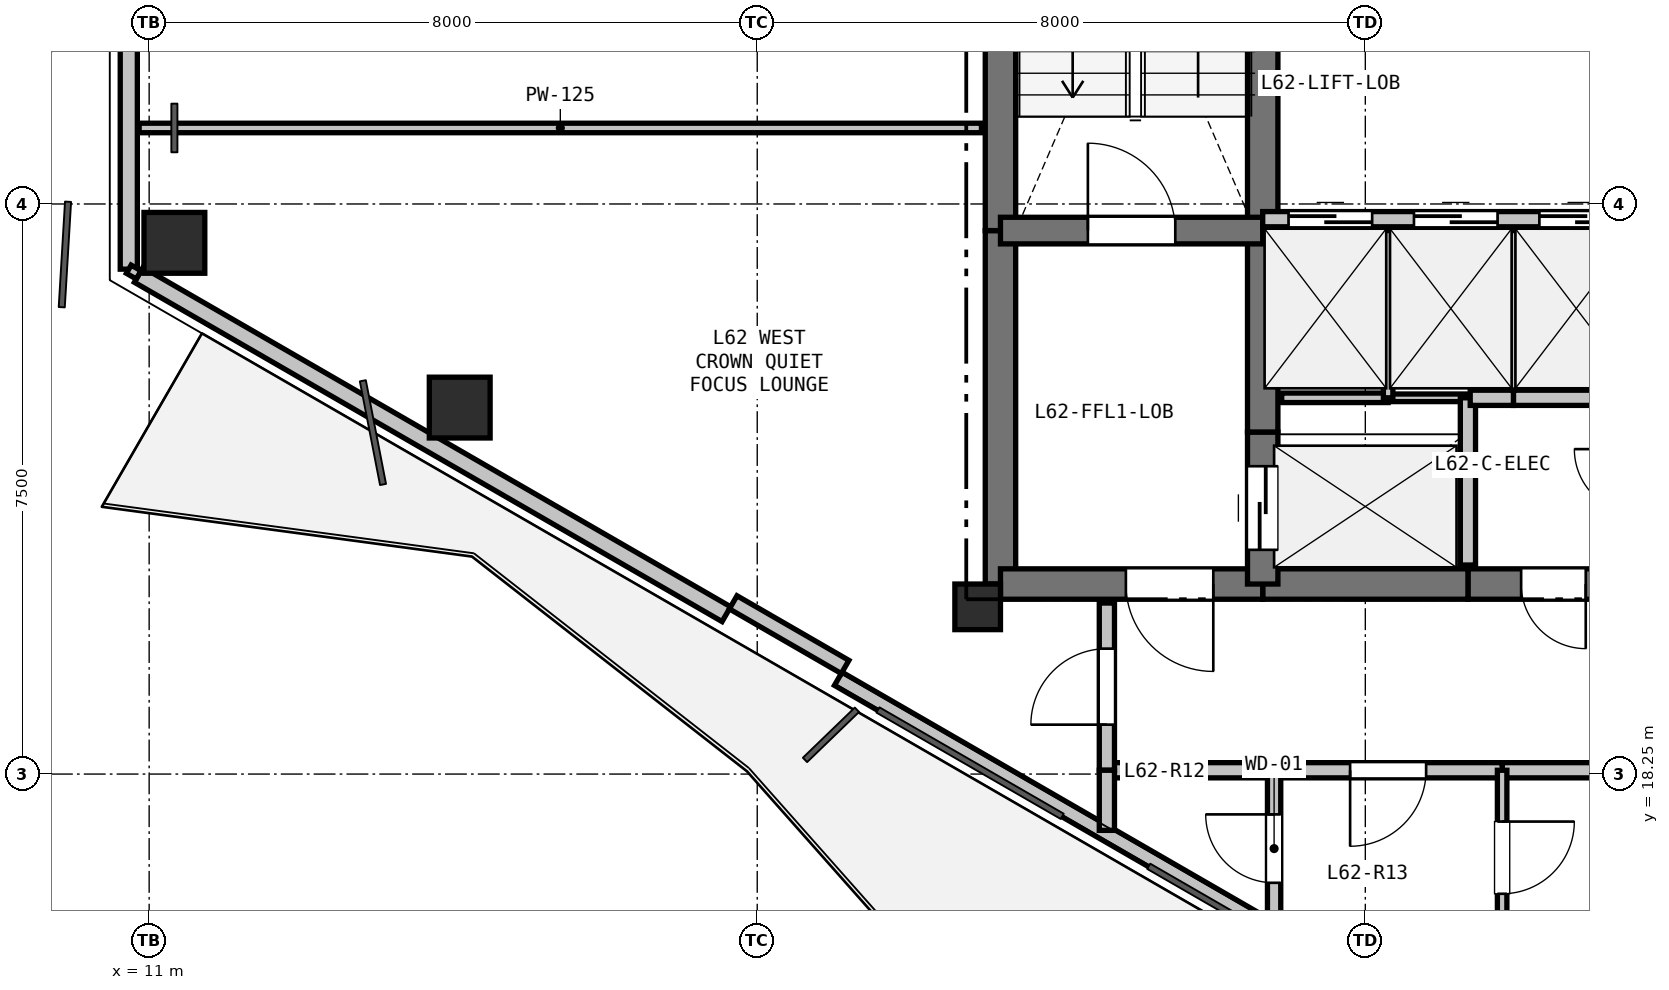
"""IFC4 building model, lengths in metres.
Left out: names, types, materials, properties, quantities, classifications, styles, units other than length and angle.
Written with IfcOpenShell. Run it as: python <this file> out.ifc"""

import sys

from ifc_helpers import new_model, si_unit, direction, frame, frame_2d, origin, origin_2d, place, context, subcontext, project, spatial, rectangle, hollow_rectangle, extrude, element, fill, save


model = new_model("IFC4")
c1 = context("Model", 3, precision=1e-05, world=origin(), true_north=direction((0.0, 1.0)))
c2 = subcontext(c1, "Body", "Model", "MODEL_VIEW")
j1 = project(units=[si_unit("LENGTHUNIT", "METRE"), si_unit("PLANEANGLEUNIT", "RADIAN")], contexts=[c1])
p1 = place(None, origin())
s1 = spatial("IfcSite", under=j1, at=p1, CompositionType="ELEMENT")
p2 = place(p1, origin())
s2 = spatial("IfcBuilding", under=s1, at=p2, CompositionType="ELEMENT")
p3 = place(p2, frame((0.0, 0.0, 223.2)))
s3 = spatial("IfcBuildingStorey", under=s2, at=p3, CompositionType="ELEMENT", Elevation=223.2)
p4 = place(p3, frame((21.9, 20.45, 0.0), z_axis=(0.0, 0.0, 1.0), x_axis=(1.0, 0.0, 0.0)))
e1 = element("IfcColumn", 1, at=p4, inside=s3, PredefinedType="COLUMN", context=c2, shape_type="SweptSolid", body=[
    extrude(rectangle(XDim=0.6, YDim=0.6, at=origin_2d()), origin(), (0.0, 0.0, 1.0), 3.3),
])
for number, where, z_axis, x_axis in (
    (2, (15.086, 23.072, -0.22), (0.0, 0.0, 1.0), (1.0, 0.0, 0.0)),
    (3, (11.332, 25.239, -0.22), (0.0, 0.0, 1.0), (1.0, 0.0, 0.0)),
):
    element("IfcColumn", number, at=place(p3, frame(where, z_axis=z_axis, x_axis=x_axis)), inside=s3, PredefinedType="COLUMN", context=c2, shape_type="SweptSolid", body=[
        extrude(hollow_rectangle(XDim=0.8, YDim=0.8, WallThickness=0.025, at=origin_2d()), origin(), (0.0, 0.0, 1.0), 3.52),
    ])
p5 = place(p3, frame((10.732, 24.892, 0.0), z_axis=(0.0, 0.0, 1.0), x_axis=(0.0, 1.0, 0.0)))
e4 = element("IfcWall", 4, at=p5, inside=s3, PredefinedType="SOLIDWALL", context=c2, shape_type="SweptSolid", body=[
    extrude(rectangle(XDim=3.715, YDim=0.225, at=frame_2d((1.858, 0.0))), origin(), (0.0, 0.0, 1.0), 2.7),
])
p6 = place(p3, frame((27.191, 15.389, 0.0), z_axis=(0.0, 0.0, 1.0), x_axis=(-0.866019557082, 0.500010126649, 0.0)))
e5 = element("IfcWall", 5, at=p6, inside=s3, PredefinedType="PARAPET", context=c2, shape_type="SweptSolid", body=[
    extrude(rectangle(XDim=8.228, YDim=0.2, at=frame_2d((4.114, 0.0))), origin(), (0.0, 0.0, 1.0), 0.2),
])
p7 = place(p3, frame((18.594, 20.354, 0.0), z_axis=(0.0, 0.0, 1.0), x_axis=(-0.866026655105, 0.499997832642, 0.0)))
e6 = element("IfcWall", 6, at=p7, inside=s3, PredefinedType="SOLIDWALL", context=c2, shape_type="SweptSolid", body=[
    extrude(rectangle(XDim=8.928, YDim=0.225, at=frame_2d((4.464, 0.0))), origin(), (0.0, 0.0, 1.0), 2.7),
])
p8 = place(p3, frame((20.156, 19.659, 0.0), z_axis=(0.0, 0.0, 1.0), x_axis=(-0.866025371046, 0.500000056704, 0.0)))
e7 = element("IfcWall", 7, at=p8, inside=s3, PredefinedType="PARAPET", context=c2, shape_type="SweptSolid", body=[
    extrude(rectangle(XDim=1.7, YDim=0.2, at=frame_2d((0.85, 0.0))), origin(), (0.0, 0.0, 1.0), 2.7),
])
p9 = place(p3, frame((22.2, 20.75, 0.0), z_axis=(0.0, 0.0, 1.0), x_axis=(0.0, 1.0, 0.0)))
e8 = element("IfcWall", 8, at=p9, inside=s3, PredefinedType="SHEAR", context=c2, shape_type="SweptSolid", body=[
    extrude(rectangle(XDim=4.65, YDim=0.4, at=frame_2d((2.325, 0.0))), origin(), (0.0, 0.0, 1.0), 3.08),
])
p10 = place(p3, frame((22.2, 25.4, 0.0), z_axis=(0.0, 0.0, 1.0), x_axis=(0.0, 1.0, 0.0)))
e9 = element("IfcWall", 9, at=p10, inside=s3, PredefinedType="SHEAR", context=c2, shape_type="SweptSolid", body=[
    extrude(rectangle(XDim=7.35, YDim=0.4, at=frame_2d((3.675, 0.0))), origin(), (0.0, 0.0, 1.0), 3.08),
])
p11 = place(p3, frame((30.6, 20.75, 0.0), z_axis=(0.0, 0.0, 1.0), x_axis=(-1.0, 0.0, 0.0)))
e10 = element("IfcWall", 10, at=p11, inside=s3, PredefinedType="SHEAR", context=c2, shape_type="SweptSolid", body=[
    extrude(rectangle(XDim=2.25, YDim=0.4, at=frame_2d((1.125, 0.0))), origin(), (0.0, 0.0, 1.0), 3.08),
])
p12 = place(p11, frame((0.7, 0.0, 0.0)))
e11 = element("IfcOpeningElement", 11, at=p12, cuts=e10, PredefinedType="OPENING", context=c2, shape_type="SweptSolid", body=[
    extrude(rectangle(XDim=0.85, YDim=2.1, at=frame_2d((0.425, 1.05))), frame((0.0, 0.21, 0.0), z_axis=(0.0, -1.0, 0.0), x_axis=(1.0, 0.0, 0.0)), (0.0, 0.0, 1.0), 0.42),
])
p13 = place(p3, frame((28.35, 20.75, 0.0), z_axis=(0.0, 0.0, 1.0), x_axis=(-1.0, 0.0, 0.0)))
e12 = element("IfcWall", 12, at=p13, inside=s3, PredefinedType="SHEAR", context=c2, shape_type="SweptSolid", body=[
    extrude(rectangle(XDim=2.7, YDim=0.4, at=frame_2d((1.35, 0.0))), origin(), (0.0, 0.0, 1.0), 3.08),
])
p14 = place(p3, frame((25.65, 20.75, 0.0), z_axis=(0.0, 0.0, 1.0), x_axis=(-1.0, 0.0, 0.0)))
e13 = element("IfcWall", 13, at=p14, inside=s3, PredefinedType="SHEAR", context=c2, shape_type="SweptSolid", body=[
    extrude(rectangle(XDim=3.45, YDim=0.4, at=frame_2d((1.725, 0.0))), origin(), (0.0, 0.0, 1.0), 3.08),
])
p15 = place(p14, frame((0.65, 0.0, 0.0)))
e14 = element("IfcOpeningElement", 14, at=p15, cuts=e13, PredefinedType="OPENING", context=c2, shape_type="SweptSolid", body=[
    extrude(rectangle(XDim=1.15, YDim=2.15, at=frame_2d((0.575, 1.075))), frame((0.0, 0.21, 0.0), z_axis=(0.0, -1.0, 0.0), x_axis=(1.0, 0.0, 0.0)), (0.0, 0.0, 1.0), 0.42),
])
p16 = place(p3, frame((25.65, 20.75, 0.0), z_axis=(0.0, 0.0, 1.0), x_axis=(0.0, 1.0, 0.0)))
e15 = element("IfcWall", 15, at=p16, inside=s3, PredefinedType="SHEAR", context=c2, shape_type="SweptSolid", body=[
    extrude(rectangle(XDim=2.0, YDim=0.4, at=frame_2d((1.0, 0.0))), origin(), (0.0, 0.0, 1.0), 3.08),
])
p17 = place(p16, frame((0.45, 0.0, 0.0)))
e16 = element("IfcOpeningElement", 16, at=p17, cuts=e15, PredefinedType="OPENING", context=c2, shape_type="SweptSolid", body=[
    extrude(rectangle(XDim=1.1, YDim=2.15, at=frame_2d((0.55, 1.075))), frame((0.0, 0.21, 0.0), z_axis=(0.0, -1.0, 0.0), x_axis=(1.0, 0.0, 0.0)), (0.0, 0.0, 1.0), 0.42),
])
p18 = place(p3, frame((25.65, 22.75, 0.0), z_axis=(0.0, 0.0, 1.0), x_axis=(0.0, 1.0, 0.0)))
e17 = element("IfcWall", 17, at=p18, inside=s3, PredefinedType="SHEAR", context=c2, shape_type="SweptSolid", body=[
    extrude(rectangle(XDim=2.8, YDim=0.4, at=frame_2d((1.4, 0.0))), origin(), (0.0, 0.0, 1.0), 3.08),
])
p19 = place(p3, frame((25.65, 25.55, 0.0), z_axis=(0.0, 0.0, 1.0), x_axis=(0.0, 1.0, 0.0)))
e18 = element("IfcWall", 18, at=p19, inside=s3, PredefinedType="SHEAR", context=c2, shape_type="SweptSolid", body=[
    extrude(rectangle(XDim=2.4, YDim=0.4, at=frame_2d((1.2, 0.0))), origin(), (0.0, 0.0, 1.0), 3.08),
])
p20 = place(p3, frame((22.2, 25.4, 0.0), z_axis=(0.0, 0.0, 1.0), x_axis=(1.0, 0.0, 0.0)))
e19 = element("IfcWall", 19, at=p20, inside=s3, PredefinedType="SHEAR", context=c2, shape_type="SweptSolid", body=[
    extrude(rectangle(XDim=3.45, YDim=0.35, at=frame_2d((1.725, 0.0))), origin(), (0.0, 0.0, 1.0), 3.08),
])
p21 = place(p20, frame((1.15, 0.0, 0.0)))
e20 = element("IfcOpeningElement", 20, at=p21, cuts=e19, PredefinedType="OPENING", context=c2, shape_type="SweptSolid", body=[
    extrude(rectangle(XDim=1.15, YDim=2.15, at=frame_2d((0.575, 1.075))), frame((0.0, 0.185, 0.0), z_axis=(0.0, -1.0, 0.0), x_axis=(1.0, 0.0, 0.0)), (0.0, 0.0, 1.0), 0.37),
])
p22 = place(p3, frame((25.65, 25.55, 0.0), z_axis=(0.0, 0.0, 1.0), x_axis=(1.0, 0.0, 0.0)))
e21 = element("IfcWall", 21, at=p22, inside=s3, PredefinedType="PARTITIONING", context=c2, shape_type="SweptSolid", body=[
    extrude(rectangle(XDim=4.95, YDim=0.2, at=frame_2d((2.475, 0.0))), origin(), (0.0, 0.0, 1.0), 3.08),
])
p23 = place(p22, frame((0.34, 0.0, 0.0)))
e22 = element("IfcOpeningElement", 22, at=p23, cuts=e21, PredefinedType="OPENING", context=c2, shape_type="SweptSolid", body=[
    extrude(rectangle(XDim=1.1, YDim=2.15, at=frame_2d((0.55, 1.075))), frame((0.0, 0.11, 0.0), z_axis=(0.0, -1.0, 0.0), x_axis=(1.0, 0.0, 0.0)), (0.0, 0.0, 1.0), 0.22),
])
p24 = place(p22, frame((1.99, 0.0, 0.0)))
e23 = element("IfcOpeningElement", 23, at=p24, cuts=e21, PredefinedType="OPENING", context=c2, shape_type="SweptSolid", body=[
    extrude(rectangle(XDim=1.1, YDim=2.15, at=frame_2d((0.55, 1.075))), frame((0.0, 0.11, 0.0), z_axis=(0.0, -1.0, 0.0), x_axis=(1.0, 0.0, 0.0)), (0.0, 0.0, 1.0), 0.22),
])
p25 = place(p22, frame((3.64, 0.0, 0.0)))
e24 = element("IfcOpeningElement", 24, at=p25, cuts=e21, PredefinedType="OPENING", context=c2, shape_type="SweptSolid", body=[
    extrude(rectangle(XDim=1.1, YDim=2.15, at=frame_2d((0.55, 1.075))), frame((0.0, 0.11, 0.0), z_axis=(0.0, -1.0, 0.0), x_axis=(1.0, 0.0, 0.0)), (0.0, 0.0, 1.0), 0.22),
])
p26 = place(p3, frame((25.9, 23.2, 0.0), z_axis=(0.0, 0.0, 1.0), x_axis=(1.0, 0.0, 0.0)))
e25 = element("IfcWall", 25, at=p26, inside=s3, PredefinedType="PARTITIONING", context=c2, shape_type="SweptSolid", body=[
    extrude(rectangle(XDim=1.4, YDim=0.125, at=frame_2d((0.7, 0.0))), origin(), (0.0, 0.0, 1.0), 3.08),
])
p27 = place(p3, frame((27.3, 23.2, 0.0), z_axis=(0.0, 0.0, 1.0), x_axis=(1.0, 0.0, 0.0)))
e26 = element("IfcWall", 26, at=p27, inside=s3, PredefinedType="PARTITIONING", context=c2, shape_type="SweptSolid", body=[
    extrude(rectangle(XDim=1.05, YDim=0.1, at=frame_2d((0.525, 0.0))), origin(), (0.0, 0.0, 1.0), 3.08),
])
p28 = place(p3, frame((28.35, 23.2, 0.0), z_axis=(0.0, 0.0, 1.0), x_axis=(0.0, -1.0, 0.0)))
e27 = element("IfcWall", 27, at=p28, inside=s3, PredefinedType="PARTITIONING", context=c2, shape_type="SweptSolid", body=[
    extrude(rectangle(XDim=2.2, YDim=0.2, at=frame_2d((1.1, 0.0))), origin(), (0.0, 0.0, 1.0), 3.08),
])
p29 = place(p3, frame((27.3, 25.4, 0.0), z_axis=(0.0, 0.0, 1.0), x_axis=(0.0, -1.0, 0.0)))
e28 = element("IfcWall", 28, at=p29, inside=s3, PredefinedType="PARTITIONING", context=c2, shape_type="SweptSolid", body=[
    extrude(rectangle(XDim=2.2, YDim=0.125, at=frame_2d((1.1, 0.0))), origin(), (0.0, 0.0, 1.0), 3.08),
])
p30 = place(p3, frame((28.95, 25.4, 0.0), z_axis=(0.0, 0.0, 1.0), x_axis=(0.0, -1.0, 0.0)))
e29 = element("IfcWall", 29, at=p30, inside=s3, PredefinedType="PARTITIONING", context=c2, shape_type="SweptSolid", body=[
    extrude(rectangle(XDim=2.2, YDim=0.1, at=frame_2d((1.1, 0.0))), origin(), (0.0, 0.0, 1.0), 3.08),
])
p31 = place(p3, frame((28.95, 23.2, 0.0), z_axis=(0.0, 0.0, 1.0), x_axis=(-1.0, 0.0, 0.0)))
e30 = element("IfcWall", 30, at=p31, inside=s3, PredefinedType="PARTITIONING", context=c2, shape_type="SweptSolid", body=[
    extrude(rectangle(XDim=0.57, YDim=0.2, at=frame_2d((0.285, 0.0))), origin(), (0.0, 0.0, 1.0), 3.08),
])
p32 = place(p3, frame((30.6, 23.2, 0.0), z_axis=(0.0, 0.0, 1.0), x_axis=(-1.0, 0.0, 0.0)))
e31 = element("IfcWall", 31, at=p32, inside=s3, PredefinedType="PARTITIONING", context=c2, shape_type="SweptSolid", body=[
    extrude(rectangle(XDim=1.65, YDim=0.2, at=frame_2d((0.825, 0.0))), origin(), (0.0, 0.0, 1.0), 3.08),
])
p33 = place(p3, frame((32.2, 18.3, 0.0), z_axis=(0.0, 0.0, 1.0), x_axis=(-1.0, 0.0, 0.0)))
e32 = element("IfcWall", 32, at=p33, inside=s3, PredefinedType="PARTITIONING", context=c2, shape_type="SweptSolid", body=[
    extrude(rectangle(XDim=3.4, YDim=0.2, at=frame_2d((1.7, 0.0))), origin(), (0.0, 0.0, 1.0), 3.08),
])
p34 = place(p3, frame((28.8, 18.3, 0.0), z_axis=(0.0, 0.0, 1.0), x_axis=(-1.0, 0.0, 0.0)))
e33 = element("IfcWall", 33, at=p34, inside=s3, PredefinedType="PARTITIONING", context=c2, shape_type="SweptSolid", body=[
    extrude(rectangle(XDim=3.0, YDim=0.2, at=frame_2d((1.5, 0.0))), origin(), (0.0, 0.0, 1.0), 3.08),
])
p35 = place(p34, frame((1.0, 0.0, 0.0)))
e34 = element("IfcOpeningElement", 34, at=p35, cuts=e33, PredefinedType="OPENING", context=c2, shape_type="SweptSolid", body=[
    extrude(rectangle(XDim=1.0, YDim=2.15, at=frame_2d((0.5, 1.075))), frame((0.0, 0.11, 0.0), z_axis=(0.0, -1.0, 0.0), x_axis=(1.0, 0.0, 0.0)), (0.0, 0.0, 1.0), 0.22),
])
p36 = place(p3, frame((25.8, 18.3, 0.0), z_axis=(0.0, 0.0, 1.0), x_axis=(-1.0, 0.0, 0.0)))
e35 = element("IfcWall", 35, at=p36, inside=s3, PredefinedType="PARTITIONING", context=c2, shape_type="SweptSolid", body=[
    extrude(rectangle(XDim=2.2, YDim=0.2, at=frame_2d((1.1, 0.0))), origin(), (0.0, 0.0, 1.0), 2.365),
])
p37 = place(p3, frame((23.6, 18.3, 0.0), z_axis=(0.0, 0.0, 1.0), x_axis=(0.0, 1.0, 0.0)))
e36 = element("IfcWall", 36, at=p37, inside=s3, PredefinedType="PARTITIONING", context=c2, shape_type="SweptSolid", body=[
    extrude(rectangle(XDim=2.2, YDim=0.2, at=frame_2d((1.1, 0.0))), origin(), (0.0, 0.0, 1.0), 2.528),
])
p38 = place(p37, frame((0.6, 0.0, 0.0)))
e37 = element("IfcOpeningElement", 37, at=p38, cuts=e36, PredefinedType="OPENING", context=c2, shape_type="SweptSolid", body=[
    extrude(rectangle(XDim=1.0, YDim=2.15, at=frame_2d((0.5, 1.075))), frame((0.0, 0.11, 0.0), z_axis=(0.0, -1.0, 0.0), x_axis=(1.0, 0.0, 0.0)), (0.0, 0.0, 1.0), 0.22),
])
p39 = place(p3, frame((28.8, 18.3, 0.0), z_axis=(0.0, 0.0, 1.0), x_axis=(0.0, -1.0, 0.0)))
e38 = element("IfcWall", 38, at=p39, inside=s3, PredefinedType="PARTITIONING", context=c2, shape_type="SweptSolid", body=[
    extrude(rectangle(XDim=2.3, YDim=0.125, at=frame_2d((1.15, 0.0))), origin(), (0.0, 0.0, 1.0), 3.08),
])
p40 = place(p39, frame((0.675, 0.0, 0.0)))
e39 = element("IfcOpeningElement", 39, at=p40, cuts=e38, PredefinedType="OPENING", context=c2, shape_type="SweptSolid", body=[
    extrude(rectangle(XDim=0.95, YDim=2.1, at=frame_2d((0.475, 1.05))), frame((0.0, 0.073, 0.0), z_axis=(0.0, -1.0, 0.0), x_axis=(1.0, 0.0, 0.0)), (0.0, 0.0, 1.0), 0.145),
])
p41 = place(p3, frame((25.8, 16.239, 0.0), z_axis=(0.0, 0.0, 1.0), x_axis=(0.0, 1.0, 0.0)))
e40 = element("IfcWall", 40, at=p41, inside=s3, PredefinedType="PLUMBINGWALL", context=c2, shape_type="SweptSolid", body=[
    extrude(rectangle(XDim=2.061, YDim=0.175, at=frame_2d((1.031, 0.0))), origin(), (0.0, 0.0, 1.0), 2.365),
])
p42 = place(p41, frame((0.581, 0.0, 0.0)))
e41 = element("IfcOpeningElement", 41, at=p42, cuts=e40, PredefinedType="OPENING", context=c2, shape_type="SweptSolid", body=[
    extrude(rectangle(XDim=0.9, YDim=2.1, at=frame_2d((0.45, 1.05))), frame((0.0, 0.097, 0.0), z_axis=(0.0, -1.0, 0.0), x_axis=(1.0, 0.0, 0.0)), (0.0, 0.0, 1.0), 0.195),
])
p43 = place(p3, frame((23.6, 17.509, 0.0), z_axis=(0.0, 0.0, 1.0), x_axis=(0.0, 1.0, 0.0)))
e42 = element("IfcWall", 42, at=p43, inside=s3, PredefinedType="PARTITIONING", context=c2, shape_type="SweptSolid", body=[
    extrude(rectangle(XDim=0.791, YDim=0.2, at=frame_2d((0.396, 0.0))), origin(), (0.0, 0.0, 1.0), 2.365),
])
p44 = place(p3, frame((21.95, 26.75, 0.0), z_axis=(0.0, 0.0, 1.0), x_axis=(-1.0, 0.0, 0.0)))
e43 = element("IfcWall", 43, at=p44, inside=s3, PredefinedType="PARTITIONING", context=c2, shape_type="SweptSolid", body=[
    extrude(rectangle(XDim=11.082, YDim=0.125, at=frame_2d((5.541, 0.0))), origin(), (0.0, 0.0, 1.0), 2.605),
])
p45 = place(p3, frame((10.862, 24.817, 0.0), z_axis=(0.0, 0.0, 1.0), x_axis=(-0.866131372301, 0.499816412211, 0.0)))
e44 = element("IfcWall", 44, at=p45, inside=s3, PredefinedType="PARTITIONING", context=c2, shape_type="SweptSolid", body=[
    extrude(rectangle(XDim=0.15, YDim=0.125, at=frame_2d((0.075, 0.0))), origin(), (0.0, 0.0, 1.0), 3.08),
])
p46 = place(p23, origin())
e45 = element("IfcDoor", 45, at=p46, inside=s3, OperationType="SLIDING_TO_LEFT", PredefinedType="DOOR", context=c2, shape_type="SweptSolid", body=[
    extrude(rectangle(XDim=1.1, YDim=2.15, at=frame_2d((0.55, 1.075))), frame((0.0, 0.025, 0.0), z_axis=(0.0, -1.0, 0.0), x_axis=(1.0, 0.0, 0.0)), (0.0, 0.0, 1.0), 0.05),
])
fill(e22, e45)
p47 = place(p24, origin())
e46 = element("IfcDoor", 46, at=p47, inside=s3, OperationType="SLIDING_TO_LEFT", PredefinedType="DOOR", context=c2, shape_type="SweptSolid", body=[
    extrude(rectangle(XDim=1.1, YDim=2.15, at=frame_2d((0.55, 1.075))), frame((0.0, 0.025, 0.0), z_axis=(0.0, -1.0, 0.0), x_axis=(1.0, 0.0, 0.0)), (0.0, 0.0, 1.0), 0.05),
])
fill(e23, e46)
p48 = place(p25, origin())
e47 = element("IfcDoor", 47, at=p48, inside=s3, OperationType="SLIDING_TO_LEFT", PredefinedType="DOOR", context=c2, shape_type="SweptSolid", body=[
    extrude(rectangle(XDim=1.1, YDim=2.15, at=frame_2d((0.55, 1.075))), frame((0.0, 0.025, 0.0), z_axis=(0.0, -1.0, 0.0), x_axis=(1.0, 0.0, 0.0)), (0.0, 0.0, 1.0), 0.05),
])
fill(e24, e47)
p49 = place(p17, origin())
e48 = element("IfcDoor", 48, at=p49, inside=s3, OperationType="SLIDING_TO_LEFT", PredefinedType="DOOR", context=c2, shape_type="SweptSolid", body=[
    extrude(rectangle(XDim=1.1, YDim=2.15, at=frame_2d((0.55, 1.075))), frame((0.0, 0.025, 0.0), z_axis=(0.0, -1.0, 0.0), x_axis=(1.0, 0.0, 0.0)), (0.0, 0.0, 1.0), 0.05),
])
fill(e16, e48)
p50 = place(p21, origin())
e49 = element("IfcDoor", 49, at=p50, inside=s3, OperationType="SINGLE_SWING_LEFT", PredefinedType="DOOR", context=c2, shape_type="SweptSolid", body=[
    extrude(rectangle(XDim=1.15, YDim=2.15, at=frame_2d((0.575, 1.075))), frame((0.0, 0.025, 0.0), z_axis=(0.0, -1.0, 0.0), x_axis=(1.0, 0.0, 0.0)), (0.0, 0.0, 1.0), 0.05),
])
fill(e20, e49)
p51 = place(p15, origin())
e50 = element("IfcDoor", 50, at=p51, inside=s3, OperationType="SINGLE_SWING_LEFT", PredefinedType="DOOR", context=c2, shape_type="SweptSolid", body=[
    extrude(rectangle(XDim=1.15, YDim=2.15, at=frame_2d((0.575, 1.075))), frame((0.0, 0.025, 0.0), z_axis=(0.0, -1.0, 0.0), x_axis=(1.0, 0.0, 0.0)), (0.0, 0.0, 1.0), 0.05),
])
fill(e14, e50)
p52 = place(p35, origin())
e51 = element("IfcDoor", 51, at=p52, inside=s3, OperationType="SINGLE_SWING_RIGHT", PredefinedType="DOOR", context=c2, shape_type="SweptSolid", body=[
    extrude(rectangle(XDim=1.0, YDim=2.15, at=frame_2d((0.5, 1.075))), frame((0.0, 0.025, 0.0), z_axis=(0.0, -1.0, 0.0), x_axis=(1.0, 0.0, 0.0)), (0.0, 0.0, 1.0), 0.05),
])
fill(e34, e51)
p53 = place(p12, origin())
e52 = element("IfcDoor", 52, at=p53, inside=s3, OperationType="SINGLE_SWING_LEFT", PredefinedType="DOOR", context=c2, shape_type="SweptSolid", body=[
    extrude(rectangle(XDim=0.85, YDim=2.1, at=frame_2d((0.425, 1.05))), frame((0.0, 0.025, 0.0), z_axis=(0.0, -1.0, 0.0), x_axis=(1.0, 0.0, 0.0)), (0.0, 0.0, 1.0), 0.05),
])
fill(e11, e52)
p54 = place(p38, origin())
e53 = element("IfcDoor", 53, at=p54, inside=s3, OperationType="SINGLE_SWING_LEFT", PredefinedType="DOOR", context=c2, shape_type="SweptSolid", body=[
    extrude(rectangle(XDim=1.0, YDim=2.15, at=frame_2d((0.5, 1.075))), frame((0.0, 0.025, 0.0), z_axis=(0.0, -1.0, 0.0), x_axis=(1.0, 0.0, 0.0)), (0.0, 0.0, 1.0), 0.05),
])
fill(e37, e53)
p55 = place(p42, origin())
e54 = element("IfcDoor", 54, at=p55, inside=s3, OperationType="SINGLE_SWING_RIGHT", PredefinedType="DOOR", context=c2, shape_type="SweptSolid", body=[
    extrude(rectangle(XDim=0.9, YDim=2.1, at=frame_2d((0.45, 1.05))), frame((0.0, 0.025, 0.0), z_axis=(0.0, -1.0, 0.0), x_axis=(1.0, 0.0, 0.0)), (0.0, 0.0, 1.0), 0.05),
])
fill(e41, e54)
p56 = place(p40, origin())
e55 = element("IfcDoor", 55, at=p56, inside=s3, OperationType="SINGLE_SWING_LEFT", PredefinedType="DOOR", context=c2, shape_type="SweptSolid", body=[
    extrude(rectangle(XDim=0.95, YDim=2.1, at=frame_2d((0.475, 1.05))), frame((0.0, 0.025, 0.0), z_axis=(0.0, -1.0, 0.0), x_axis=(1.0, 0.0, 0.0)), (0.0, 0.0, 1.0), 0.05),
])
fill(e39, e55)
save(model, sys.argv[1])
